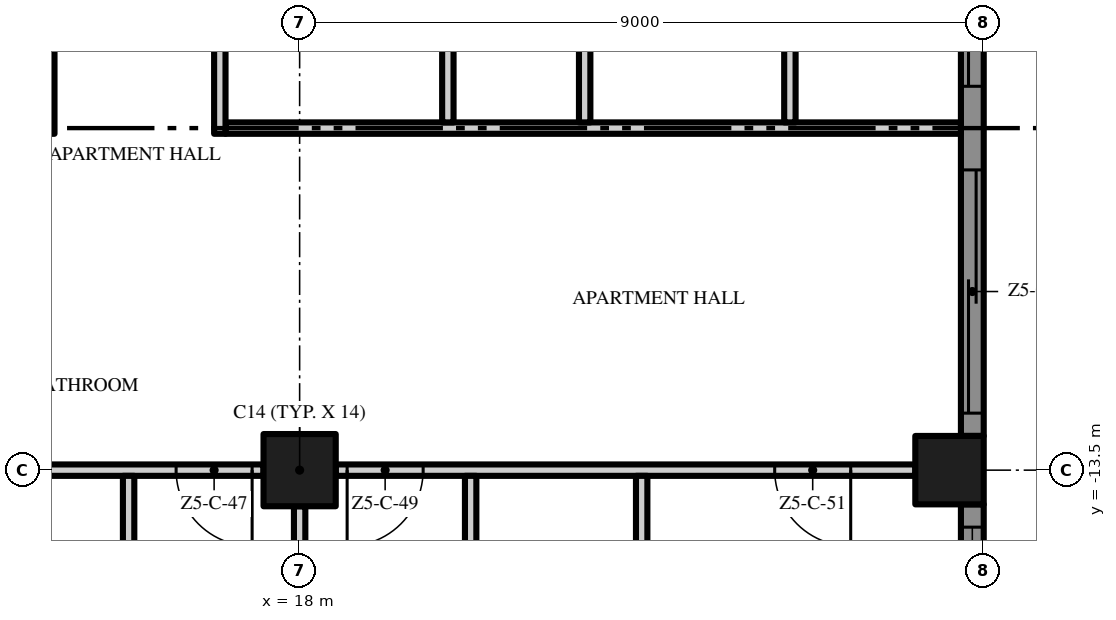
"""IFC4 building model, lengths in metres.
Left out: names, types, materials, properties, quantities, classifications, styles, units other than length and angle.
Written with IfcOpenShell. Run it as: python <this file> out.ifc"""

import sys

from ifc_helpers import new_model, si_unit, direction, frame, frame_2d, origin, origin_2d, place, context, subcontext, project, spatial, polyline, rectangle, outline, extrude, element, fill, save


model = new_model("IFC4")
c1 = context("Model", 3, precision=1e-05, world=origin(), true_north=direction((0.0, 1.0)))
c2 = subcontext(c1, "Body", "Model", "MODEL_VIEW")
j1 = project(units=[si_unit("LENGTHUNIT", "METRE"), si_unit("PLANEANGLEUNIT", "RADIAN")], contexts=[c1])
p1 = place(None, origin())
s1 = spatial("IfcSite", under=j1, at=p1, CompositionType="ELEMENT")
p2 = place(p1, origin())
s2 = spatial("IfcBuilding", under=s1, at=p2, CompositionType="ELEMENT")
p3 = place(p2, frame((0.0, 0.0, 261.6)))
s3 = spatial("IfcBuildingStorey", under=s2, at=p3, CompositionType="ELEMENT", Elevation=261.6)
p4 = place(p3, frame((18.0, -13.5, 0.0), z_axis=(0.0, 0.0, 1.0), x_axis=(1.0, 0.0, 0.0)))
e1 = element("IfcColumn", 1, at=p4, inside=s3, PredefinedType="COLUMN", context=c2, shape_type="SweptSolid", body=[
    extrude(rectangle(XDim=0.95, YDim=0.95, at=origin_2d()), origin(), (0.0, 0.0, 1.0), 3.5),
])
p5 = place(p3, frame((26.55, -13.5, 0.0), z_axis=(0.0, 0.0, 1.0), x_axis=(1.0, 0.0, 0.0)))
e2 = element("IfcColumn", 2, at=p5, inside=s3, PredefinedType="COLUMN", context=c2, shape_type="SweptSolid", body=[
    extrude(rectangle(XDim=0.9, YDim=0.9, at=origin_2d()), origin(), (0.0, 0.0, 1.0), 3.5),
])
p6 = place(p3, frame((26.85, -13.95, 0.0), z_axis=(0.0, 0.0, 1.0), x_axis=(0.0, -1.0, 0.0)))
e3 = element("IfcWall", 3, at=p6, inside=s3, PredefinedType="SOLIDWALL", context=c2, shape_type="SweptSolid", body=[
    extrude(rectangle(XDim=3.75, YDim=0.3, at=frame_2d((1.875, 0.0))), origin(), (0.0, 0.0, 1.0), 3.5),
])
p7 = place(p6, frame((0.3, 0.0, 0.45)))
e4 = element("IfcOpeningElement", 4, at=p7, cuts=e3, PredefinedType="OPENING", context=c2, shape_type="SweptSolid", body=[
    extrude(rectangle(XDim=3.15, YDim=2.65, at=frame_2d((1.575, 1.325))), frame((0.0, 0.16, 0.0), z_axis=(0.0, -1.0, 0.0), x_axis=(1.0, 0.0, 0.0)), (0.0, 0.0, 1.0), 0.32),
])
p8 = place(p3, frame((26.85, -4.95, 0.0), z_axis=(0.0, 0.0, 1.0), x_axis=(0.0, -1.0, 0.0)))
e5 = element("IfcWall", 5, at=p8, inside=s3, PredefinedType="SOLIDWALL", context=c2, shape_type="SweptSolid", body=[
    extrude(rectangle(XDim=8.1, YDim=0.3, at=frame_2d((4.05, 0.0))), origin(), (0.0, 0.0, 1.0), 3.5),
])
p9 = place(p8, frame((4.6, 0.0, 0.0)))
e6 = element("IfcOpeningElement", 6, at=p9, cuts=e5, PredefinedType="OPENING", context=c2, shape_type="SweptSolid", body=[
    extrude(rectangle(XDim=3.2, YDim=2.4, at=frame_2d((1.6, 1.2))), frame((0.0, 0.16, 0.0), z_axis=(0.0, -1.0, 0.0), x_axis=(1.0, 0.0, 0.0)), (0.0, 0.0, 1.0), 0.32),
])
p10 = place(p8, frame((0.3, 0.0, 0.0)))
e7 = element("IfcOpeningElement", 7, at=p10, cuts=e5, PredefinedType="OPENING", context=c2, shape_type="SweptSolid", body=[
    extrude(rectangle(XDim=3.2, YDim=2.4, at=frame_2d((1.6, 1.2))), frame((0.0, 0.16, 0.0), z_axis=(0.0, -1.0, 0.0), x_axis=(1.0, 0.0, 0.0)), (0.0, 0.0, 1.0), 0.32),
])
p11 = place(p3, origin())
e8 = element("IfcWall", 8, at=p11, inside=s3, PredefinedType="USERDEFINED", context=c2, shape_type="SweptSolid", body=[
    extrude(outline(polyline([(27.951, -18.0), (27.615, -16.5), (27.6, -16.125), (27.731, -15.0), (28.255, -13.5), (28.988, -12.0), (29.649, -10.5), (29.985, -9.0), (30.0, -8.625), (29.869, -7.5), (29.345, -6.0), (28.612, -4.5), (27.951, -3.0), (27.615, -1.5), (27.6, -1.125), (27.731, 0.0), (28.255, 1.5), (28.988, 3.0), (29.649, 4.5), (29.985, 6.0), (30.0, 6.375), (29.869, 7.5), (29.345, 9.0), (28.612, 10.5), (27.951, 12.0), (27.615, 13.5), (27.6, 13.875), (27.731, 15.0), (28.255, 16.5), (28.988, 18.0), (28.763, 18.11), (28.024, 16.596), (27.486, 15.056), (27.349, 13.885), (27.366, 13.467), (27.713, 11.921), (28.385, 10.395), (29.114, 8.904), (29.624, 7.444), (29.749, 6.365), (29.736, 6.033), (29.41, 4.579), (28.761, 3.105), (28.024, 1.596), (27.486, 0.056), (27.349, -1.115), (27.366, -1.533), (27.713, -3.079), (28.385, -4.605), (29.114, -6.096), (29.624, -7.556), (29.749, -8.635), (29.736, -8.967), (29.41, -10.421), (28.761, -11.895), (28.024, -13.404), (27.486, -14.944), (27.349, -16.115), (27.366, -16.533), (27.708, -18.055), (27.951, -18.0)])), origin(), (0.0, 0.0, 1.0), 0.9),
])
p12 = place(p3, frame((17.525, -13.5, 0.0), z_axis=(0.0, 0.0, 1.0), x_axis=(-1.0, 0.0, 0.0)))
e9 = element("IfcWall", 9, at=p12, inside=s3, PredefinedType="PARTITIONING", context=c2, shape_type="SweptSolid", body=[
    extrude(rectangle(XDim=8.05, YDim=0.15, at=frame_2d((4.025, 0.0))), origin(), (0.0, 0.0, 1.0), 3.5),
])
p13 = place(p12, frame((6.1, 0.0, 0.0)))
e10 = element("IfcOpeningElement", 10, at=p13, cuts=e9, PredefinedType="OPENING", context=c2, shape_type="SweptSolid", body=[
    extrude(rectangle(XDim=1.8, YDim=2.4, at=frame_2d((0.9, 1.2))), frame((0.0, 0.085, 0.0), z_axis=(0.0, -1.0, 0.0), x_axis=(1.0, 0.0, 0.0)), (0.0, 0.0, 1.0), 0.17),
])
p14 = place(p12, frame((0.15, 0.0, 0.0)))
e11 = element("IfcOpeningElement", 11, at=p14, cuts=e9, PredefinedType="OPENING", context=c2, shape_type="SweptSolid", body=[
    extrude(rectangle(XDim=1.0, YDim=2.4, at=frame_2d((0.5, 1.2))), frame((0.0, 0.085, 0.0), z_axis=(0.0, -1.0, 0.0), x_axis=(1.0, 0.0, 0.0)), (0.0, 0.0, 1.0), 0.17),
])
p15 = place(p3, frame((26.1, -13.5, 0.0), z_axis=(0.0, 0.0, 1.0), x_axis=(-1.0, 0.0, 0.0)))
e12 = element("IfcWall", 12, at=p15, inside=s3, PredefinedType="PARTITIONING", context=c2, shape_type="SweptSolid", body=[
    extrude(rectangle(XDim=7.625, YDim=0.15, at=frame_2d((3.812, 0.0))), origin(), (0.0, 0.0, 1.0), 3.5),
])
p16 = place(p15, frame((6.475, 0.0, 0.0)))
e13 = element("IfcOpeningElement", 13, at=p16, cuts=e12, PredefinedType="OPENING", context=c2, shape_type="SweptSolid", body=[
    extrude(rectangle(XDim=1.0, YDim=2.4, at=frame_2d((0.5, 1.2))), frame((0.0, 0.085, 0.0), z_axis=(0.0, -1.0, 0.0), x_axis=(1.0, 0.0, 0.0)), (0.0, 0.0, 1.0), 0.17),
])
p17 = place(p15, frame((0.85, 0.0, 0.0)))
e14 = element("IfcOpeningElement", 14, at=p17, cuts=e12, PredefinedType="OPENING", context=c2, shape_type="SweptSolid", body=[
    extrude(rectangle(XDim=1.0, YDim=2.4, at=frame_2d((0.5, 1.2))), frame((0.0, 0.085, 0.0), z_axis=(0.0, -1.0, 0.0), x_axis=(1.0, 0.0, 0.0)), (0.0, 0.0, 1.0), 0.17),
])
p18 = place(p3, frame((17.025, -9.0, 0.0), z_axis=(0.0, 0.0, 1.0), x_axis=(1.0, 0.0, 0.0)))
e15 = element("IfcWall", 15, at=p18, inside=s3, PredefinedType="PARTITIONING", context=c2, shape_type="SweptSolid", body=[
    extrude(rectangle(XDim=9.675, YDim=0.15, at=frame_2d((4.838, 0.0))), origin(), (0.0, 0.0, 1.0), 3.5),
])
p19 = place(p3, frame((14.7, -9.075, 0.0), z_axis=(0.0, 0.0, 1.0), x_axis=(0.0, 1.0, 0.0)))
e16 = element("IfcWall", 16, at=p19, inside=s3, PredefinedType="PARTITIONING", context=c2, shape_type="SweptSolid", body=[
    extrude(rectangle(XDim=4.65, YDim=0.15, at=frame_2d((2.325, 0.0))), origin(), (0.0, 0.0, 1.0), 3.5),
])
p20 = place(p19, frame((1.875, 0.0, 0.0)))
e17 = element("IfcOpeningElement", 17, at=p20, cuts=e16, PredefinedType="OPENING", context=c2, shape_type="SweptSolid", body=[
    extrude(rectangle(XDim=0.9, YDim=2.1, at=frame_2d((0.45, 1.05))), frame((0.0, 0.085, 0.0), z_axis=(0.0, -1.0, 0.0), x_axis=(1.0, 0.0, 0.0)), (0.0, 0.0, 1.0), 0.17),
])
p21 = place(p3, frame((15.75, -16.575, 0.0), z_axis=(0.0, 0.0, 1.0), x_axis=(0.0, 1.0, 0.0)))
e18 = element("IfcWall", 18, at=p21, inside=s3, PredefinedType="PARTITIONING", context=c2, shape_type="SweptSolid", body=[
    extrude(rectangle(XDim=3.0, YDim=0.15, at=frame_2d((1.5, 0.0))), origin(), (0.0, 0.0, 1.0), 3.5),
])
p22 = place(p3, frame((16.95, -9.075, 0.0), z_axis=(0.0, 0.0, 1.0), x_axis=(0.0, 1.0, 0.0)))
e19 = element("IfcWall", 19, at=p22, inside=s3, PredefinedType="PARTITIONING", context=c2, shape_type="SweptSolid", body=[
    extrude(rectangle(XDim=4.65, YDim=0.15, at=frame_2d((2.325, 0.0))), origin(), (0.0, 0.0, 1.0), 3.5),
])
p23 = place(p3, frame((18.0, -21.6, 0.0), z_axis=(0.0, 0.0, 1.0), x_axis=(0.0, 1.0, 0.0)))
e20 = element("IfcWall", 20, at=p23, inside=s3, PredefinedType="PARTITIONING", context=c2, shape_type="SweptSolid", body=[
    extrude(rectangle(XDim=7.625, YDim=0.15, at=frame_2d((3.812, 0.0))), origin(), (0.0, 0.0, 1.0), 3.5),
])
p24 = place(p3, frame((19.95, -8.925, 0.0), z_axis=(0.0, 0.0, 1.0), x_axis=(0.0, 1.0, 0.0)))
e21 = element("IfcWall", 21, at=p24, inside=s3, PredefinedType="PARTITIONING", context=c2, shape_type="SweptSolid", body=[
    extrude(rectangle(XDim=4.35, YDim=0.15, at=frame_2d((2.175, 0.0))), origin(), (0.0, 0.0, 1.0), 3.5),
])
p25 = place(p3, frame((20.25, -16.575, 0.0), z_axis=(0.0, 0.0, 1.0), x_axis=(0.0, 1.0, 0.0)))
e22 = element("IfcWall", 22, at=p25, inside=s3, PredefinedType="PARTITIONING", context=c2, shape_type="SweptSolid", body=[
    extrude(rectangle(XDim=3.0, YDim=0.15, at=frame_2d((1.5, 0.0))), origin(), (0.0, 0.0, 1.0), 3.5),
])
p26 = place(p3, frame((21.75, -8.925, 0.0), z_axis=(0.0, 0.0, 1.0), x_axis=(0.0, 1.0, 0.0)))
e23 = element("IfcWall", 23, at=p26, inside=s3, PredefinedType="PARTITIONING", context=c2, shape_type="SweptSolid", body=[
    extrude(rectangle(XDim=4.35, YDim=0.15, at=frame_2d((2.175, 0.0))), origin(), (0.0, 0.0, 1.0), 3.5),
])
p27 = place(p3, frame((22.5, -17.55, 0.0), z_axis=(0.0, 0.0, 1.0), x_axis=(0.0, 1.0, 0.0)))
e24 = element("IfcWall", 24, at=p27, inside=s3, PredefinedType="PARTITIONING", context=c2, shape_type="SweptSolid", body=[
    extrude(rectangle(XDim=3.975, YDim=0.15, at=frame_2d((1.988, 0.0))), origin(), (0.0, 0.0, 1.0), 3.5),
])
p28 = place(p3, frame((24.45, -8.925, 0.0), z_axis=(0.0, 0.0, 1.0), x_axis=(0.0, 1.0, 0.0)))
e25 = element("IfcWall", 25, at=p28, inside=s3, PredefinedType="PARTITIONING", context=c2, shape_type="SweptSolid", body=[
    extrude(rectangle(XDim=4.35, YDim=0.15, at=frame_2d((2.175, 0.0))), origin(), (0.0, 0.0, 1.0), 3.5),
])
p29 = place(p7, origin())
e26 = element("IfcWindow", 26, at=p29, inside=s3, PartitioningType="SINGLE_PANEL", PredefinedType="WINDOW", context=c2, shape_type="SweptSolid", body=[
    extrude(rectangle(XDim=3.15, YDim=2.65, at=frame_2d((1.575, 1.325))), frame((0.0, 0.03, 0.0), z_axis=(0.0, -1.0, 0.0), x_axis=(1.0, 0.0, 0.0)), (0.0, 0.0, 1.0), 0.06),
])
fill(e4, e26)
p30 = place(p9, origin())
e27 = element("IfcDoor", 27, at=p30, inside=s3, OperationType="SINGLE_SWING_LEFT", PredefinedType="DOOR", context=c2, shape_type="SweptSolid", body=[
    extrude(rectangle(XDim=3.2, YDim=2.4, at=frame_2d((1.6, 1.2))), frame((0.0, 0.025, 0.0), z_axis=(0.0, -1.0, 0.0), x_axis=(1.0, 0.0, 0.0)), (0.0, 0.0, 1.0), 0.05),
])
fill(e6, e27)
p31 = place(p10, origin())
e28 = element("IfcDoor", 28, at=p31, inside=s3, OperationType="SINGLE_SWING_LEFT", PredefinedType="DOOR", context=c2, shape_type="SweptSolid", body=[
    extrude(rectangle(XDim=3.2, YDim=2.4, at=frame_2d((1.6, 1.2))), frame((0.0, 0.025, 0.0), z_axis=(0.0, -1.0, 0.0), x_axis=(1.0, 0.0, 0.0)), (0.0, 0.0, 1.0), 0.05),
])
fill(e7, e28)
p32 = place(p14, origin())
e29 = element("IfcDoor", 29, at=p32, inside=s3, OperationType="SINGLE_SWING_LEFT", PredefinedType="DOOR", context=c2, shape_type="SweptSolid", body=[
    extrude(rectangle(XDim=1.0, YDim=2.4, at=frame_2d((0.5, 1.2))), frame((0.0, 0.025, 0.0), z_axis=(0.0, -1.0, 0.0), x_axis=(1.0, 0.0, 0.0)), (0.0, 0.0, 1.0), 0.05),
])
fill(e11, e29)
p33 = place(p16, origin())
e30 = element("IfcDoor", 30, at=p33, inside=s3, OperationType="SINGLE_SWING_RIGHT", PredefinedType="DOOR", context=c2, shape_type="SweptSolid", body=[
    extrude(rectangle(XDim=1.0, YDim=2.4, at=frame_2d((0.5, 1.2))), frame((0.0, 0.025, 0.0), z_axis=(0.0, -1.0, 0.0), x_axis=(1.0, 0.0, 0.0)), (0.0, 0.0, 1.0), 0.05),
])
fill(e13, e30)
p34 = place(p17, origin())
e31 = element("IfcDoor", 31, at=p34, inside=s3, OperationType="SINGLE_SWING_LEFT", PredefinedType="DOOR", context=c2, shape_type="SweptSolid", body=[
    extrude(rectangle(XDim=1.0, YDim=2.4, at=frame_2d((0.5, 1.2))), frame((0.0, 0.025, 0.0), z_axis=(0.0, -1.0, 0.0), x_axis=(1.0, 0.0, 0.0)), (0.0, 0.0, 1.0), 0.05),
])
fill(e14, e31)
save(model, sys.argv[1])
